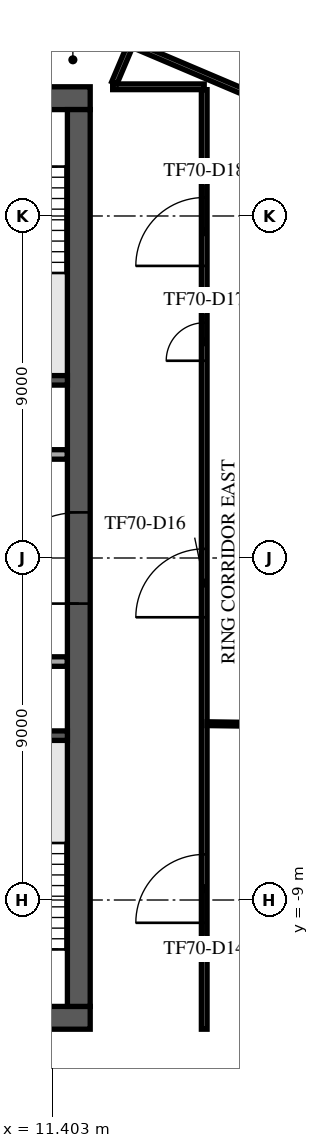
"""IFC4 building model, lengths in metres.
Left out: names, types, materials, properties, quantities, classifications, styles, units other than length and angle.
Written with IfcOpenShell. Run it as: python <this file> out.ifc"""

import sys

from ifc_helpers import new_model, si_unit, direction, frame, frame_2d, origin, place, context, subcontext, project, spatial, rectangle, extrude, element, fill, save


model = new_model("IFC4")
c1 = context("Model", 3, precision=1e-05, world=origin(), true_north=direction((0.0, 1.0)))
c2 = subcontext(c1, "Body", "Model", "MODEL_VIEW")
j1 = project(units=[si_unit("LENGTHUNIT", "METRE"), si_unit("PLANEANGLEUNIT", "RADIAN")], contexts=[c1])
p1 = place(None, origin())
s1 = spatial("IfcSite", under=j1, at=p1, CompositionType="ELEMENT")
p2 = place(p1, origin())
s2 = spatial("IfcBuilding", under=s1, at=p2, CompositionType="ELEMENT")
p3 = place(p2, frame((0.0, 0.0, 300.5)))
s3 = spatial("IfcBuildingStorey", under=s2, at=p3, CompositionType="ELEMENT", Elevation=300.5)
p4 = place(p3, frame((-12.4, 12.1, 0.0), z_axis=(0.0, 0.0, 1.0), x_axis=(1.0, 0.0, 0.0)))
e1 = element("IfcWall", 1, at=p4, inside=s3, PredefinedType="SHEAR", context=c2, shape_type="SweptSolid", body=[
    extrude(rectangle(XDim=24.8, YDim=0.6, at=frame_2d((12.4, 0.0))), origin(), (0.0, 0.0, 1.0), 3.65),
])
p5 = place(p4, frame((11.2, 0.0, 0.0)))
e2 = element("IfcOpeningElement", 2, at=p5, cuts=e1, PredefinedType="OPENING", context=c2, shape_type="SweptSolid", body=[
    extrude(rectangle(XDim=2.4, YDim=2.4, at=frame_2d((1.2, 1.2))), frame((0.0, 0.31, 0.0), z_axis=(0.0, -1.0, 0.0), x_axis=(1.0, 0.0, 0.0)), (0.0, 0.0, 1.0), 0.62),
])
p6 = place(p4, frame((22.025, 0.0, 0.0)))
e3 = element("IfcOpeningElement", 3, at=p6, cuts=e1, PredefinedType="OPENING", context=c2, shape_type="SweptSolid", body=[
    extrude(rectangle(XDim=1.2, YDim=2.1, at=frame_2d((0.6, 1.05))), frame((0.0, 0.31, 0.0), z_axis=(0.0, -1.0, 0.0), x_axis=(1.0, 0.0, 0.0)), (0.0, 0.0, 1.0), 0.62),
])
p7 = place(p4, frame((1.0, 0.0, 0.0)))
e4 = element("IfcOpeningElement", 4, at=p7, cuts=e1, PredefinedType="OPENING", context=c2, shape_type="SweptSolid", body=[
    extrude(rectangle(XDim=1.0, YDim=2.1, at=frame_2d((0.5, 1.05))), frame((0.0, 0.31, 0.0), z_axis=(0.0, -1.0, 0.0), x_axis=(1.0, 0.0, 0.0)), (0.0, 0.0, 1.0), 0.62),
])
p8 = place(p3, frame((-12.4, -12.1, 0.0), z_axis=(0.0, 0.0, 1.0), x_axis=(1.0, 0.0, 0.0)))
e5 = element("IfcWall", 5, at=p8, inside=s3, PredefinedType="SHEAR", context=c2, shape_type="SweptSolid", body=[
    extrude(rectangle(XDim=24.8, YDim=0.6, at=frame_2d((12.4, 0.0))), origin(), (0.0, 0.0, 1.0), 3.65),
])
p9 = place(p8, frame((7.3, 0.0, 0.0)))
e6 = element("IfcOpeningElement", 6, at=p9, cuts=e5, PredefinedType="OPENING", context=c2, shape_type="SweptSolid", body=[
    extrude(rectangle(XDim=2.0, YDim=2.1, at=frame_2d((1.0, 1.05))), frame((0.0, 0.31, 0.0), z_axis=(0.0, -1.0, 0.0), x_axis=(1.0, 0.0, 0.0)), (0.0, 0.0, 1.0), 0.62),
])
p10 = place(p8, frame((17.425, 0.0, 0.0)))
e7 = element("IfcOpeningElement", 7, at=p10, cuts=e5, PredefinedType="OPENING", context=c2, shape_type="SweptSolid", body=[
    extrude(rectangle(XDim=1.2, YDim=2.1, at=frame_2d((0.6, 1.05))), frame((0.0, 0.31, 0.0), z_axis=(0.0, -1.0, 0.0), x_axis=(1.0, 0.0, 0.0)), (0.0, 0.0, 1.0), 0.62),
])
p11 = place(p8, frame((1.575, 0.0, 0.0)))
e8 = element("IfcOpeningElement", 8, at=p11, cuts=e5, PredefinedType="OPENING", context=c2, shape_type="SweptSolid", body=[
    extrude(rectangle(XDim=1.2, YDim=2.1, at=frame_2d((0.6, 1.05))), frame((0.0, 0.31, 0.0), z_axis=(0.0, -1.0, 0.0), x_axis=(1.0, 0.0, 0.0)), (0.0, 0.0, 1.0), 0.62),
])
p12 = place(p8, frame((22.025, 0.0, 0.0)))
e9 = element("IfcOpeningElement", 9, at=p12, cuts=e5, PredefinedType="OPENING", context=c2, shape_type="SweptSolid", body=[
    extrude(rectangle(XDim=1.2, YDim=2.1, at=frame_2d((0.6, 1.05))), frame((0.0, 0.31, 0.0), z_axis=(0.0, -1.0, 0.0), x_axis=(1.0, 0.0, 0.0)), (0.0, 0.0, 1.0), 0.62),
])
p13 = place(p3, frame((12.1, -11.8, 0.0), z_axis=(0.0, 0.0, 1.0), x_axis=(0.0, 1.0, 0.0)))
e10 = element("IfcWall", 10, at=p13, inside=s3, PredefinedType="SHEAR", context=c2, shape_type="SweptSolid", body=[
    extrude(rectangle(XDim=23.6, YDim=0.6, at=frame_2d((11.8, 0.0))), origin(), (0.0, 0.0, 1.0), 3.65),
])
p14 = place(p13, frame((10.6, 0.0, 0.0)))
e11 = element("IfcOpeningElement", 11, at=p14, cuts=e10, PredefinedType="OPENING", context=c2, shape_type="SweptSolid", body=[
    extrude(rectangle(XDim=2.4, YDim=2.4, at=frame_2d((1.2, 1.2))), frame((0.0, 0.31, 0.0), z_axis=(0.0, -1.0, 0.0), x_axis=(1.0, 0.0, 0.0)), (0.0, 0.0, 1.0), 0.62),
])
for number, where, z_axis, x_axis in (
    (12, (8.65, 4.675, 0.0), (0.0, 0.0, 1.0), (1.0, 0.0, 0.0)),
    (13, (8.65, -4.675, 0.0), (0.0, 0.0, 1.0), (1.0, 0.0, 0.0)),
):
    element("IfcWall", number, at=place(p3, frame(where, z_axis=z_axis, x_axis=x_axis)), inside=s3, PredefinedType="SOLIDWALL", context=c2, shape_type="SweptSolid", body=[
        extrude(rectangle(XDim=3.15, YDim=0.25, at=frame_2d((1.575, 0.0))), origin(), (0.0, 0.0, 1.0), 3.65),
    ])
p15 = place(p3, frame((5.63, -2.725, 0.0), z_axis=(0.0, 0.0, 1.0), x_axis=(1.0, 0.0, 0.0)))
e14 = element("IfcWall", 14, at=p15, inside=s3, PredefinedType="PARTITIONING", context=c2, shape_type="SweptSolid", body=[
    extrude(rectangle(XDim=6.165, YDim=0.25, at=frame_2d((3.083, 0.0))), origin(), (0.0, 0.0, 1.0), 3.65),
])
p16 = place(p15, frame((0.745, 0.0, 0.0)))
e15 = element("IfcOpeningElement", 15, at=p16, cuts=e14, PredefinedType="OPENING", context=c2, shape_type="SweptSolid", body=[
    extrude(rectangle(XDim=1.0, YDim=2.1, at=frame_2d((0.5, 1.05))), frame((0.0, 0.135, 0.0), z_axis=(0.0, -1.0, 0.0), x_axis=(1.0, 0.0, 0.0)), (0.0, 0.0, 1.0), 0.27),
])
p17 = place(p15, frame((3.92, 0.0, 0.0)))
e16 = element("IfcOpeningElement", 16, at=p17, cuts=e14, PredefinedType="OPENING", context=c2, shape_type="SweptSolid", body=[
    extrude(rectangle(XDim=0.9, YDim=2.1, at=frame_2d((0.45, 1.05))), frame((0.0, 0.135, 0.0), z_axis=(0.0, -1.0, 0.0), x_axis=(1.0, 0.0, 0.0)), (0.0, 0.0, 1.0), 0.27),
])
p18 = place(p3, frame((-11.795, 2.725, 0.0), z_axis=(0.0, 0.0, 1.0), x_axis=(1.0, 0.0, 0.0)))
e17 = element("IfcWall", 17, at=p18, inside=s3, PredefinedType="PARTITIONING", context=c2, shape_type="SweptSolid", body=[
    extrude(rectangle(XDim=23.59, YDim=0.25, at=frame_2d((11.795, 0.0))), origin(), (0.0, 0.0, 1.0), 3.65),
])
p19 = place(p18, frame((21.345, 0.0, 0.0)))
e18 = element("IfcOpeningElement", 18, at=p19, cuts=e17, PredefinedType="OPENING", context=c2, shape_type="SweptSolid", body=[
    extrude(rectangle(XDim=0.9, YDim=2.1, at=frame_2d((0.45, 1.05))), frame((0.0, 0.135, 0.0), z_axis=(0.0, -1.0, 0.0), x_axis=(1.0, 0.0, 0.0)), (0.0, 0.0, 1.0), 0.27),
])
p20 = place(p18, frame((1.345, 0.0, 0.0)))
e19 = element("IfcOpeningElement", 19, at=p20, cuts=e17, PredefinedType="OPENING", context=c2, shape_type="SweptSolid", body=[
    extrude(rectangle(XDim=0.9, YDim=2.1, at=frame_2d((0.45, 1.05))), frame((0.0, 0.135, 0.0), z_axis=(0.0, -1.0, 0.0), x_axis=(1.0, 0.0, 0.0)), (0.0, 0.0, 1.0), 0.27),
])
p21 = place(p18, frame((4.42, 0.0, 0.0)))
e20 = element("IfcOpeningElement", 20, at=p21, cuts=e17, PredefinedType="OPENING", context=c2, shape_type="SweptSolid", body=[
    extrude(rectangle(XDim=1.0, YDim=2.1, at=frame_2d((0.5, 1.05))), frame((0.0, 0.135, 0.0), z_axis=(0.0, -1.0, 0.0), x_axis=(1.0, 0.0, 0.0)), (0.0, 0.0, 1.0), 0.27),
])
p22 = place(p18, frame((9.82, 0.0, 0.0)))
e21 = element("IfcOpeningElement", 21, at=p22, cuts=e17, PredefinedType="OPENING", context=c2, shape_type="SweptSolid", body=[
    extrude(rectangle(XDim=1.2, YDim=2.1, at=frame_2d((0.6, 1.05))), frame((0.0, 0.135, 0.0), z_axis=(0.0, -1.0, 0.0), x_axis=(1.0, 0.0, 0.0)), (0.0, 0.0, 1.0), 0.27),
])
p23 = place(p3, frame((15.204, -32.515, 0.0), z_axis=(0.0, 0.0, 1.0), x_axis=(0.390728997462, 0.920505758017, 0.0)))
e22 = element("IfcWall", 22, at=p23, inside=s3, PredefinedType="STANDARD", context=c2, shape_type="SweptSolid", body=[
    extrude(rectangle(XDim=47.979, YDim=0.6, at=frame_2d((23.99, 0.0))), origin(), (0.0, 0.0, 1.0), 3.65),
])
p24 = place(p23, frame((1.231, 0.0, 0.9)))
e23 = element("IfcOpeningElement", 23, at=p24, cuts=e22, PredefinedType="OPENING", context=c2, shape_type="SweptSolid", body=[
    extrude(rectangle(XDim=1.9, YDim=2.1, at=frame_2d((0.95, 1.05))), frame((0.0, 0.31, 0.0), z_axis=(0.0, -1.0, 0.0), x_axis=(1.0, 0.0, 0.0)), (0.0, 0.0, 1.0), 0.62),
])
p25 = place(p23, frame((5.593, 0.0, 0.9)))
e24 = element("IfcOpeningElement", 24, at=p25, cuts=e22, PredefinedType="OPENING", context=c2, shape_type="SweptSolid", body=[
    extrude(rectangle(XDim=1.9, YDim=2.1, at=frame_2d((0.95, 1.05))), frame((0.0, 0.31, 0.0), z_axis=(0.0, -1.0, 0.0), x_axis=(1.0, 0.0, 0.0)), (0.0, 0.0, 1.0), 0.62),
])
p26 = place(p23, frame((9.954, 0.0, 0.9)))
e25 = element("IfcOpeningElement", 25, at=p26, cuts=e22, PredefinedType="OPENING", context=c2, shape_type="SweptSolid", body=[
    extrude(rectangle(XDim=1.9, YDim=2.1, at=frame_2d((0.95, 1.05))), frame((0.0, 0.31, 0.0), z_axis=(0.0, -1.0, 0.0), x_axis=(1.0, 0.0, 0.0)), (0.0, 0.0, 1.0), 0.62),
])
p27 = place(p23, frame((14.316, 0.0, 0.9)))
e26 = element("IfcOpeningElement", 26, at=p27, cuts=e22, PredefinedType="OPENING", context=c2, shape_type="SweptSolid", body=[
    extrude(rectangle(XDim=1.9, YDim=2.1, at=frame_2d((0.95, 1.05))), frame((0.0, 0.31, 0.0), z_axis=(0.0, -1.0, 0.0), x_axis=(1.0, 0.0, 0.0)), (0.0, 0.0, 1.0), 0.62),
])
p28 = place(p23, frame((18.678, 0.0, 0.9)))
e27 = element("IfcOpeningElement", 27, at=p28, cuts=e22, PredefinedType="OPENING", context=c2, shape_type="SweptSolid", body=[
    extrude(rectangle(XDim=1.9, YDim=2.1, at=frame_2d((0.95, 1.05))), frame((0.0, 0.31, 0.0), z_axis=(0.0, -1.0, 0.0), x_axis=(1.0, 0.0, 0.0)), (0.0, 0.0, 1.0), 0.62),
])
p29 = place(p23, frame((23.04, 0.0, 0.9)))
e28 = element("IfcOpeningElement", 28, at=p29, cuts=e22, PredefinedType="OPENING", context=c2, shape_type="SweptSolid", body=[
    extrude(rectangle(XDim=1.9, YDim=2.1, at=frame_2d((0.95, 1.05))), frame((0.0, 0.31, 0.0), z_axis=(0.0, -1.0, 0.0), x_axis=(1.0, 0.0, 0.0)), (0.0, 0.0, 1.0), 0.62),
])
p30 = place(p23, frame((27.401, 0.0, 0.9)))
e29 = element("IfcOpeningElement", 29, at=p30, cuts=e22, PredefinedType="OPENING", context=c2, shape_type="SweptSolid", body=[
    extrude(rectangle(XDim=1.9, YDim=2.1, at=frame_2d((0.95, 1.05))), frame((0.0, 0.31, 0.0), z_axis=(0.0, -1.0, 0.0), x_axis=(1.0, 0.0, 0.0)), (0.0, 0.0, 1.0), 0.62),
])
p31 = place(p23, frame((31.763, 0.0, 0.9)))
e30 = element("IfcOpeningElement", 30, at=p31, cuts=e22, PredefinedType="OPENING", context=c2, shape_type="SweptSolid", body=[
    extrude(rectangle(XDim=1.9, YDim=2.1, at=frame_2d((0.95, 1.05))), frame((0.0, 0.31, 0.0), z_axis=(0.0, -1.0, 0.0), x_axis=(1.0, 0.0, 0.0)), (0.0, 0.0, 1.0), 0.62),
])
p32 = place(p23, frame((36.125, 0.0, 0.9)))
e31 = element("IfcOpeningElement", 31, at=p32, cuts=e22, PredefinedType="OPENING", context=c2, shape_type="SweptSolid", body=[
    extrude(rectangle(XDim=1.9, YDim=2.1, at=frame_2d((0.95, 1.05))), frame((0.0, 0.31, 0.0), z_axis=(0.0, -1.0, 0.0), x_axis=(1.0, 0.0, 0.0)), (0.0, 0.0, 1.0), 0.62),
])
p33 = place(p23, frame((40.487, 0.0, 0.9)))
e32 = element("IfcOpeningElement", 32, at=p33, cuts=e22, PredefinedType="OPENING", context=c2, shape_type="SweptSolid", body=[
    extrude(rectangle(XDim=1.9, YDim=2.1, at=frame_2d((0.95, 1.05))), frame((0.0, 0.31, 0.0), z_axis=(0.0, -1.0, 0.0), x_axis=(1.0, 0.0, 0.0)), (0.0, 0.0, 1.0), 0.62),
])
p34 = place(p23, frame((44.848, 0.0, 0.9)))
e33 = element("IfcOpeningElement", 33, at=p34, cuts=e22, PredefinedType="OPENING", context=c2, shape_type="SweptSolid", body=[
    extrude(rectangle(XDim=1.9, YDim=2.1, at=frame_2d((0.95, 1.05))), frame((0.0, 0.31, 0.0), z_axis=(0.0, -1.0, 0.0), x_axis=(1.0, 0.0, 0.0)), (0.0, 0.0, 1.0), 0.62),
])
p35 = place(p3, frame((-8.176, 25.325, 0.0), z_axis=(0.0, 0.0, 1.0), x_axis=(0.920507643781, -0.390724554821, 0.0)))
e34 = element("IfcWall", 34, at=p35, inside=s3, PredefinedType="PARTITIONING", context=c2, shape_type="SweptSolid", body=[
    extrude(rectangle(XDim=34.917, YDim=0.15, at=frame_2d((17.458, 0.0))), origin(), (0.0, 0.0, 1.0), 3.25),
])
p36 = place(p35, frame((5.55, 0.0, 0.0)))
e35 = element("IfcOpeningElement", 35, at=p36, cuts=e34, PredefinedType="OPENING", context=c2, shape_type="SweptSolid", body=[
    extrude(rectangle(XDim=1.8, YDim=2.1, at=frame_2d((0.9, 1.05))), frame((0.0, 0.085, 0.0), z_axis=(0.0, -1.0, 0.0), x_axis=(1.0, 0.0, 0.0)), (0.0, 0.0, 1.0), 0.17),
])
p37 = place(p35, frame((1.05, 0.0, 0.0)))
e36 = element("IfcOpeningElement", 36, at=p37, cuts=e34, PredefinedType="OPENING", context=c2, shape_type="SweptSolid", body=[
    extrude(rectangle(XDim=1.0, YDim=2.1, at=frame_2d((0.5, 1.05))), frame((0.0, 0.085, 0.0), z_axis=(0.0, -1.0, 0.0), x_axis=(1.0, 0.0, 0.0)), (0.0, 0.0, 1.0), 0.17),
])
p38 = place(p35, frame((16.098, 0.0, 0.0)))
e37 = element("IfcOpeningElement", 37, at=p38, cuts=e34, PredefinedType="OPENING", context=c2, shape_type="SweptSolid", body=[
    extrude(rectangle(XDim=1.0, YDim=2.1, at=frame_2d((0.5, 1.05))), frame((0.0, 0.085, 0.0), z_axis=(0.0, -1.0, 0.0), x_axis=(1.0, 0.0, 0.0)), (0.0, 0.0, 1.0), 0.17),
])
p39 = place(p35, frame((23.547, 0.0, 0.0)))
e38 = element("IfcOpeningElement", 38, at=p39, cuts=e34, PredefinedType="OPENING", context=c2, shape_type="SweptSolid", body=[
    extrude(rectangle(XDim=1.0, YDim=2.1, at=frame_2d((0.5, 1.05))), frame((0.0, 0.085, 0.0), z_axis=(0.0, -1.0, 0.0), x_axis=(1.0, 0.0, 0.0)), (0.0, 0.0, 1.0), 0.17),
])
p40 = place(p3, frame((12.991, 12.4, 0.0), z_axis=(0.0, 0.0, 1.0), x_axis=(1.0, 0.0, 0.0)))
e39 = element("IfcWall", 39, at=p40, inside=s3, PredefinedType="PARTITIONING", context=c2, shape_type="SweptSolid", body=[
    extrude(rectangle(XDim=2.409, YDim=0.15, at=frame_2d((1.205, 0.0))), origin(), (0.0, 0.0, 1.0), 3.13),
])
p41 = place(p3, frame((13.035, 12.504, 0.0), z_axis=(0.0, 0.0, 1.0), x_axis=(0.390634335845, 0.920545933487, 0.0)))
e40 = element("IfcWall", 40, at=p41, inside=s3, PredefinedType="PARTITIONING", context=c2, shape_type="SweptSolid", body=[
    extrude(rectangle(XDim=1.113, YDim=0.15, at=frame_2d((0.557, 0.0))), origin(), (0.0, 0.0, 1.0), 3.13),
])
p42 = place(p3, frame((13.539, 13.5, 0.0), z_axis=(0.0, 0.0, 1.0), x_axis=(0.920505387388, -0.390729870613, 0.0)))
e41 = element("IfcWall", 41, at=p42, inside=s3, PredefinedType="PARTITIONING", context=c2, shape_type="SweptSolid", body=[
    extrude(rectangle(XDim=10.309, YDim=0.15, at=frame_2d((5.154, 0.0))), origin(), (0.0, 0.0, 1.0), 3.25),
])
p43 = place(p3, frame((15.4, -12.4, 0.0), z_axis=(0.0, 0.0, 1.0), x_axis=(0.0, 1.0, 0.0)))
e42 = element("IfcWall", 42, at=p43, inside=s3, PredefinedType="PARTITIONING", context=c2, shape_type="SweptSolid", body=[
    extrude(rectangle(XDim=24.725, YDim=0.15, at=frame_2d((12.362, 0.0))), origin(), (0.0, 0.0, 1.0), 3.25),
])
p44 = place(p43, frame((2.8, 0.0, 0.0)))
e43 = element("IfcOpeningElement", 43, at=p44, cuts=e42, PredefinedType="OPENING", context=c2, shape_type="SweptSolid", body=[
    extrude(rectangle(XDim=1.8, YDim=2.1, at=frame_2d((0.9, 1.05))), frame((0.0, 0.085, 0.0), z_axis=(0.0, -1.0, 0.0), x_axis=(1.0, 0.0, 0.0)), (0.0, 0.0, 1.0), 0.17),
])
p45 = place(p43, frame((10.84, 0.0, 0.0)))
e44 = element("IfcOpeningElement", 44, at=p45, cuts=e42, PredefinedType="OPENING", context=c2, shape_type="SweptSolid", body=[
    extrude(rectangle(XDim=1.8, YDim=2.1, at=frame_2d((0.9, 1.05))), frame((0.0, 0.085, 0.0), z_axis=(0.0, -1.0, 0.0), x_axis=(1.0, 0.0, 0.0)), (0.0, 0.0, 1.0), 0.17),
])
p46 = place(p43, frame((17.59, 0.0, 0.0)))
e45 = element("IfcOpeningElement", 45, at=p46, cuts=e42, PredefinedType="OPENING", context=c2, shape_type="SweptSolid", body=[
    extrude(rectangle(XDim=1.0, YDim=2.1, at=frame_2d((0.5, 1.05))), frame((0.0, 0.085, 0.0), z_axis=(0.0, -1.0, 0.0), x_axis=(1.0, 0.0, 0.0)), (0.0, 0.0, 1.0), 0.17),
])
p47 = place(p43, frame((20.086, 0.0, 0.0)))
e46 = element("IfcOpeningElement", 46, at=p47, cuts=e42, PredefinedType="OPENING", context=c2, shape_type="SweptSolid", body=[
    extrude(rectangle(XDim=1.8, YDim=2.1, at=frame_2d((0.9, 1.05))), frame((0.0, 0.085, 0.0), z_axis=(0.0, -1.0, 0.0), x_axis=(1.0, 0.0, 0.0)), (0.0, 0.0, 1.0), 0.17),
])
p48 = place(p3, frame((15.476, -4.36, 0.0), z_axis=(0.0, 0.0, 1.0), x_axis=(0.999902345391, -0.013974966252, 0.0)))
e47 = element("IfcWall", 47, at=p48, inside=s3, PredefinedType="PARTITIONING", context=c2, shape_type="SweptSolid", body=[
    extrude(rectangle(XDim=11.286, YDim=0.1, at=frame_2d((5.643, 0.0))), origin(), (0.0, 0.0, 1.0), 3.65),
])
p49 = place(p3, frame((15.477, 6.889, 0.0), z_axis=(0.0, 0.0, 1.0), x_axis=(0.999319883967, 0.036875052648, 0.0)))
e48 = element("IfcWall", 48, at=p49, inside=s3, PredefinedType="PARTITIONING", context=c2, shape_type="SweptSolid", body=[
    extrude(rectangle(XDim=16.393, YDim=0.1, at=frame_2d((8.197, 0.0))), origin(), (0.0, 0.0, 1.0), 3.65),
])
p50 = place(p14, origin())
e49 = element("IfcDoor", 49, at=p50, inside=s3, OperationType="SINGLE_SWING_LEFT", PredefinedType="DOOR", context=c2, shape_type="SweptSolid", body=[
    extrude(rectangle(XDim=2.4, YDim=2.4, at=frame_2d((1.2, 1.2))), frame((0.0, 0.025, 0.0), z_axis=(0.0, -1.0, 0.0), x_axis=(1.0, 0.0, 0.0)), (0.0, 0.0, 1.0), 0.05),
])
fill(e11, e49)
p51 = place(p44, frame((1.8, 0.0, 0.0), z_axis=(0.0, 0.0, 1.0), x_axis=(-1.0, 0.0, 0.0)))
e50 = element("IfcDoor", 50, at=p51, inside=s3, OperationType="DOUBLE_DOOR_SINGLE_SWING", PredefinedType="DOOR", context=c2, shape_type="SweptSolid", body=[
    extrude(rectangle(XDim=1.8, YDim=2.1, at=frame_2d((0.9, 1.05))), frame((0.0, 0.025, 0.0), z_axis=(0.0, -1.0, 0.0), x_axis=(1.0, 0.0, 0.0)), (0.0, 0.0, 1.0), 0.05),
])
fill(e43, e50)
p52 = place(p45, frame((1.8, 0.0, 0.0), z_axis=(0.0, 0.0, 1.0), x_axis=(-1.0, 0.0, 0.0)))
e51 = element("IfcDoor", 51, at=p52, inside=s3, OperationType="DOUBLE_DOOR_SINGLE_SWING", PredefinedType="DOOR", context=c2, shape_type="SweptSolid", body=[
    extrude(rectangle(XDim=1.8, YDim=2.1, at=frame_2d((0.9, 1.05))), frame((0.0, 0.025, 0.0), z_axis=(0.0, -1.0, 0.0), x_axis=(1.0, 0.0, 0.0)), (0.0, 0.0, 1.0), 0.05),
])
fill(e44, e51)
p53 = place(p46, frame((1.0, 0.0, 0.0), z_axis=(0.0, 0.0, 1.0), x_axis=(-1.0, 0.0, 0.0)))
e52 = element("IfcDoor", 52, at=p53, inside=s3, OperationType="SINGLE_SWING_LEFT", PredefinedType="DOOR", context=c2, shape_type="SweptSolid", body=[
    extrude(rectangle(XDim=1.0, YDim=2.1, at=frame_2d((0.5, 1.05))), frame((0.0, 0.025, 0.0), z_axis=(0.0, -1.0, 0.0), x_axis=(1.0, 0.0, 0.0)), (0.0, 0.0, 1.0), 0.05),
])
fill(e45, e52)
p54 = place(p47, frame((1.8, 0.0, 0.0), z_axis=(0.0, 0.0, 1.0), x_axis=(-1.0, 0.0, 0.0)))
e53 = element("IfcDoor", 53, at=p54, inside=s3, OperationType="DOUBLE_DOOR_SINGLE_SWING", PredefinedType="DOOR", context=c2, shape_type="SweptSolid", body=[
    extrude(rectangle(XDim=1.8, YDim=2.1, at=frame_2d((0.9, 1.05))), frame((0.0, 0.025, 0.0), z_axis=(0.0, -1.0, 0.0), x_axis=(1.0, 0.0, 0.0)), (0.0, 0.0, 1.0), 0.05),
])
fill(e46, e53)
save(model, sys.argv[1])
